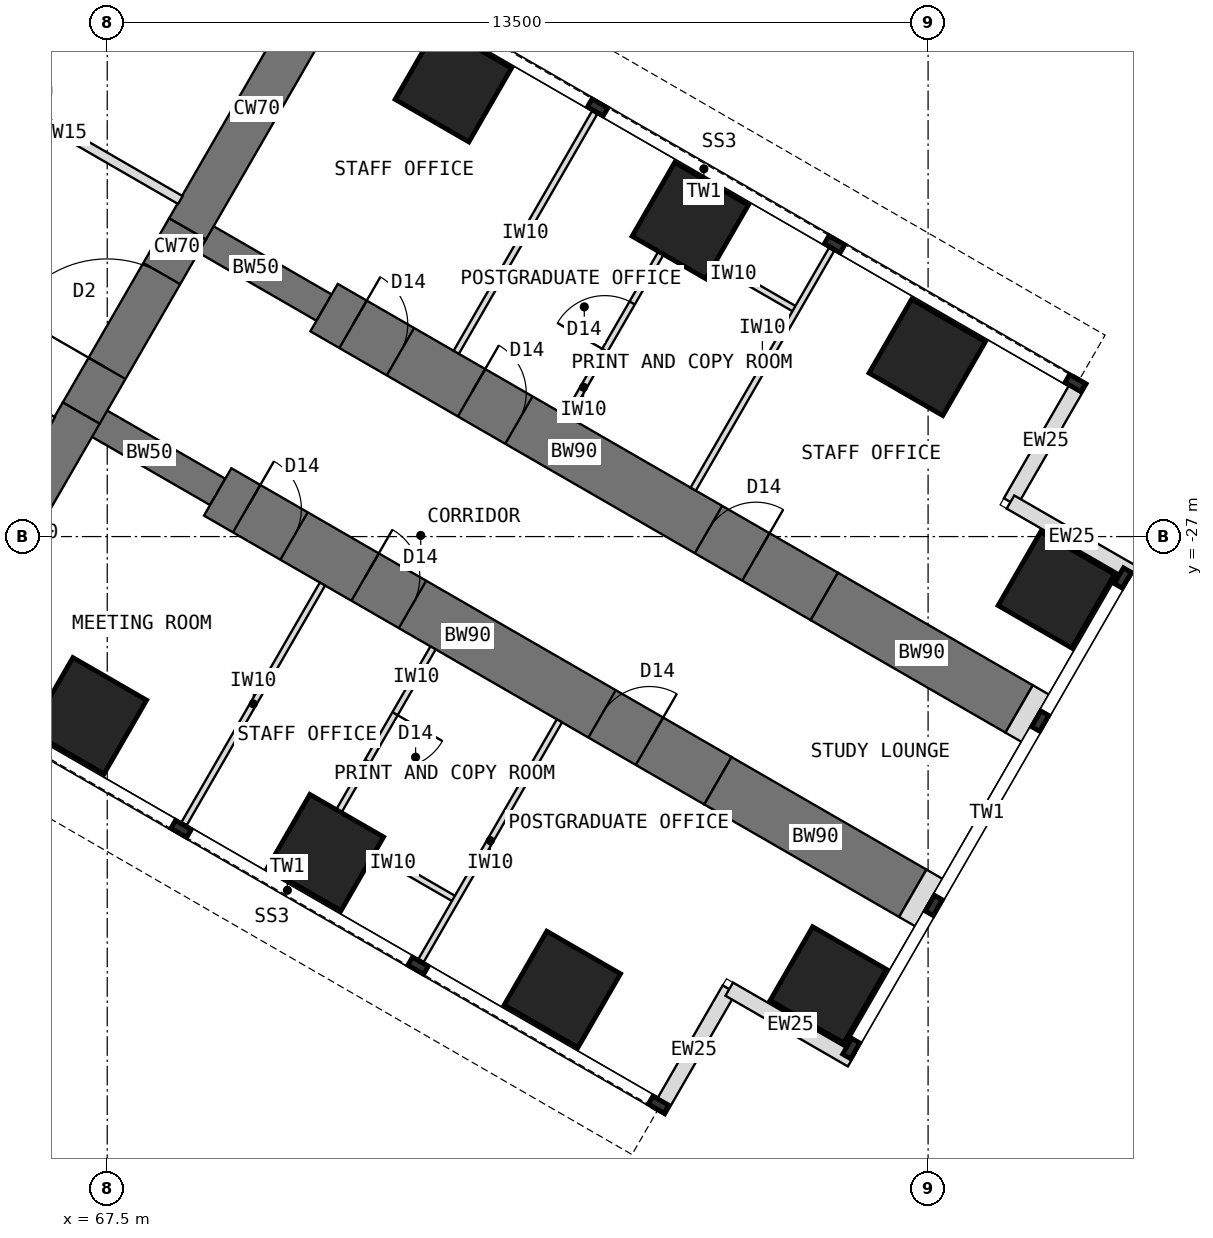
"""IFC4 building model, lengths in metres.
Left out: names, types, materials, properties, quantities, classifications, styles, units other than length and angle.
Written with IfcOpenShell. Run it as: python <this file> out.ifc"""

import sys

from ifc_helpers import new_model, si_unit, direction, frame, frame_2d, origin, origin_2d, place, context, subcontext, project, spatial, rectangle, extrude, element, fill, save


model = new_model("IFC4")
c1 = context("Model", 3, precision=1e-05, world=origin(), true_north=direction((0.0, 1.0)))
c2 = subcontext(c1, "Body", "Model", "MODEL_VIEW")
j1 = project(units=[si_unit("LENGTHUNIT", "METRE"), si_unit("PLANEANGLEUNIT", "RADIAN")], contexts=[c1])
p1 = place(None, origin())
s1 = spatial("IfcSite", under=j1, at=p1, CompositionType="ELEMENT")
p2 = place(p1, origin())
s2 = spatial("IfcBuilding", under=s1, at=p2, CompositionType="ELEMENT")
p3 = place(p2, frame((0.0, 0.0, 88.5)))
s3 = spatial("IfcBuildingStorey", under=s2, at=p3, CompositionType="ELEMENT", Elevation=88.5)
p4 = place(p3, frame((64.798, -28.908, 0.0), z_axis=(0.0, 0.0, 1.0), x_axis=(0.499984222037, 0.866034513004, 0.0)))
e1 = element("IfcWall", 1, at=p4, inside=s3, PredefinedType="SHEAR", context=c2, shape_type="SweptSolid", body=[
    extrude(rectangle(XDim=4.548, YDim=0.7, at=frame_2d((2.274, 0.0))), origin(), (0.0, 0.0, 1.0), 4.0),
])
p5 = place(p3, frame((67.072, -24.97, 0.0), z_axis=(0.0, 0.0, 1.0), x_axis=(0.500010275428, 0.866019471182, 0.0)))
e2 = element("IfcWall", 2, at=p5, inside=s3, PredefinedType="SHEAR", context=c2, shape_type="SweptSolid", body=[
    extrude(rectangle(XDim=3.5, YDim=0.7, at=frame_2d((1.75, 0.0))), origin(), (0.0, 0.0, 1.0), 4.0),
])
p6 = place(p5, frame((0.85, 0.0, 0.0)))
e3 = element("IfcOpeningElement", 3, at=p6, cuts=e2, PredefinedType="OPENING", context=c2, shape_type="SweptSolid", body=[
    extrude(rectangle(XDim=1.8, YDim=2.1, at=frame_2d((0.9, 1.05))), frame((0.0, 0.36, 0.0), z_axis=(0.0, -1.0, 0.0), x_axis=(1.0, 0.0, 0.0)), (0.0, 0.0, 1.0), 0.72),
])
p7 = place(p3, frame((68.822, -21.939, 0.0), z_axis=(0.0, 0.0, 1.0), x_axis=(0.500024481964, 0.866011268655, 0.0)))
e4 = element("IfcWall", 4, at=p7, inside=s3, PredefinedType="SHEAR", context=c2, shape_type="SweptSolid", body=[
    extrude(rectangle(XDim=4.548, YDim=0.7, at=frame_2d((2.274, 0.0))), origin(), (0.0, 0.0, 1.0), 4.0),
])
p8 = place(p3, frame((68.822, -21.939, 0.0), z_axis=(0.0, 0.0, 1.0), x_axis=(0.866072649678, -0.499918158782, 0.0)))
e5 = element("IfcWall", 5, at=p8, inside=s3, PredefinedType="SHEAR", context=c2, shape_type="SweptSolid", body=[
    extrude(rectangle(XDim=2.592, YDim=0.5, at=frame_2d((1.296, 0.0))), origin(), (0.0, 0.0, 1.0), 4.0),
])
p9 = place(p3, frame((71.066, -23.234, 0.0), z_axis=(0.0, 0.0, 1.0), x_axis=(0.86602681393, -0.499997557548, 0.0)))
e6 = element("IfcWall", 6, at=p9, inside=s3, PredefinedType="SHEAR", context=c2, shape_type="SweptSolid", body=[
    extrude(rectangle(XDim=9.5, YDim=0.9, at=frame_2d((4.75, 0.0))), origin(), (0.0, 0.0, 1.0), 4.0),
])
p10 = place(p9, frame((0.55, 0.0, 0.0)))
e7 = element("IfcOpeningElement", 7, at=p10, cuts=e6, PredefinedType="OPENING", context=c2, shape_type="SweptSolid", body=[
    extrude(rectangle(XDim=0.9, YDim=2.1, at=frame_2d((0.45, 1.05))), frame((0.0, 0.46, 0.0), z_axis=(0.0, -1.0, 0.0), x_axis=(1.0, 0.0, 0.0)), (0.0, 0.0, 1.0), 0.92),
])
p11 = place(p9, frame((2.8, 0.0, 0.0)))
e8 = element("IfcOpeningElement", 8, at=p11, cuts=e6, PredefinedType="OPENING", context=c2, shape_type="SweptSolid", body=[
    extrude(rectangle(XDim=0.9, YDim=2.1, at=frame_2d((0.45, 1.05))), frame((0.0, 0.46, 0.0), z_axis=(0.0, -1.0, 0.0), x_axis=(1.0, 0.0, 0.0)), (0.0, 0.0, 1.0), 0.92),
])
p12 = place(p9, frame((7.3, 0.0, 0.0)))
e9 = element("IfcOpeningElement", 9, at=p12, cuts=e6, PredefinedType="OPENING", context=c2, shape_type="SweptSolid", body=[
    extrude(rectangle(XDim=0.9, YDim=2.1, at=frame_2d((0.45, 1.05))), frame((0.0, 0.46, 0.0), z_axis=(0.0, -1.0, 0.0), x_axis=(1.0, 0.0, 0.0)), (0.0, 0.0, 1.0), 0.92),
])
p13 = place(p3, frame((79.294, -27.984, 0.0), z_axis=(0.0, 0.0, 1.0), x_axis=(0.866000971088, -0.500042316284, 0.0)))
e10 = element("IfcWall", 10, at=p13, inside=s3, PredefinedType="SHEAR", context=c2, shape_type="SweptSolid", body=[
    extrude(rectangle(XDim=3.7, YDim=0.9, at=frame_2d((1.85, 0.0))), origin(), (0.0, 0.0, 1.0), 4.0),
])
p14 = place(p3, frame((67.072, -24.97, 0.0), z_axis=(0.0, 0.0, 1.0), x_axis=(0.866031863473, -0.499988811324, 0.0)))
e11 = element("IfcWall", 11, at=p14, inside=s3, PredefinedType="SHEAR", context=c2, shape_type="SweptSolid", body=[
    extrude(rectangle(XDim=2.592, YDim=0.5, at=frame_2d((1.296, 0.0))), origin(), (0.0, 0.0, 1.0), 4.0),
])
p15 = place(p3, frame((69.316, -26.266, 0.0), z_axis=(0.0, 0.0, 1.0), x_axis=(0.86602681393, -0.499997557548, 0.0)))
e12 = element("IfcWall", 12, at=p15, inside=s3, PredefinedType="SHEAR", context=c2, shape_type="SweptSolid", body=[
    extrude(rectangle(XDim=9.5, YDim=0.9, at=frame_2d((4.75, 0.0))), origin(), (0.0, 0.0, 1.0), 4.0),
])
p16 = place(p15, frame((0.55, 0.0, 0.0)))
e13 = element("IfcOpeningElement", 13, at=p16, cuts=e12, PredefinedType="OPENING", context=c2, shape_type="SweptSolid", body=[
    extrude(rectangle(XDim=0.9, YDim=2.1, at=frame_2d((0.45, 1.05))), frame((0.0, 0.46, 0.0), z_axis=(0.0, -1.0, 0.0), x_axis=(1.0, 0.0, 0.0)), (0.0, 0.0, 1.0), 0.92),
])
p17 = place(p15, frame((2.8, 0.0, 0.0)))
e14 = element("IfcOpeningElement", 14, at=p17, cuts=e12, PredefinedType="OPENING", context=c2, shape_type="SweptSolid", body=[
    extrude(rectangle(XDim=0.9, YDim=2.1, at=frame_2d((0.45, 1.05))), frame((0.0, 0.46, 0.0), z_axis=(0.0, -1.0, 0.0), x_axis=(1.0, 0.0, 0.0)), (0.0, 0.0, 1.0), 0.92),
])
p18 = place(p15, frame((7.3, 0.0, 0.0)))
e15 = element("IfcOpeningElement", 15, at=p18, cuts=e12, PredefinedType="OPENING", context=c2, shape_type="SweptSolid", body=[
    extrude(rectangle(XDim=0.9, YDim=2.1, at=frame_2d((0.45, 1.05))), frame((0.0, 0.46, 0.0), z_axis=(0.0, -1.0, 0.0), x_axis=(1.0, 0.0, 0.0)), (0.0, 0.0, 1.0), 0.92),
])
p19 = place(p3, frame((77.544, -31.016, 0.0), z_axis=(0.0, 0.0, 1.0), x_axis=(0.866029545028, -0.499992827086, 0.0)))
e16 = element("IfcWall", 16, at=p19, inside=s3, PredefinedType="SHEAR", context=c2, shape_type="SweptSolid", body=[
    extrude(rectangle(XDim=3.7, YDim=0.9, at=frame_2d((1.85, 0.0))), origin(), (0.0, 0.0, 1.0), 4.0),
])
for number, where, z_axis, x_axis in (
    (17, (73.191, -19.554, 0.0), (0.0, 0.0, 1.0), (0.5, 0.866, 0.0)),
    (18, (67.191, -29.946, 0.0), (0.0, 0.0, 1.0), (0.5, 0.866, 0.0)),
    (19, (77.088, -21.804, 0.0), (0.0, 0.0, 1.0), (0.5, 0.866, 0.0)),
    (20, (71.088, -32.196, 0.0), (0.0, 0.0, 1.0), (0.5, 0.866, 0.0)),
    (21, (80.986, -24.054, 0.0), (0.0, 0.0, 1.0), (0.5, 0.866, 0.0)),
    (22, (74.986, -34.446, 0.0), (0.0, 0.0, 1.0), (0.5, 0.866, 0.0)),
    (23, (83.108, -27.877, 0.0), (0.0, 0.0, 1.0), (0.5, 0.866, 0.0)),
    (24, (79.358, -34.373, 0.0), (0.0, 0.0, 1.0), (0.5, 0.866, 0.0)),
):
    element("IfcColumn", number, at=place(p3, frame(where, z_axis=z_axis, x_axis=x_axis)), inside=s3, PredefinedType="COLUMN", context=c2, shape_type="SweptSolid", body=[
        extrude(rectangle(XDim=1.4, YDim=1.4, at=origin_2d()), origin(), (0.0, 0.0, 1.0), 4.0),
    ])
for number, where, z_axis, x_axis in (
    (25, (83.517, -24.419, 0.0), (0.0, 0.0, 1.0), (-0.5, -0.866, 0.0)),
    (26, (82.355, -26.432, 0.0), (0.0, 0.0, 1.0), (0.866, -0.5, 0.0)),
    (27, (76.567, -36.456, 0.0), (0.0, 0.0, 1.0), (0.5, 0.866, 0.0)),
    (28, (77.73, -34.443, 0.0), (0.0, 0.0, 1.0), (0.866, -0.5, 0.0)),
):
    element("IfcWall", number, at=place(p3, frame(where, z_axis=z_axis, x_axis=x_axis)), inside=s3, PredefinedType="STANDARD", context=c2, shape_type="SweptSolid", body=[
        extrude(rectangle(XDim=2.325, YDim=0.25, at=frame_2d((1.163, 0.0))), origin(), (0.0, 0.0, 1.0), 3.7),
    ])
for number, where, z_axis, x_axis in (
    (29, (82.498, -29.834, 0.0), (0.0, 0.0, 1.0), (0.866, -0.5, 0.0)),
    (30, (80.748, -32.865, 0.0), (0.0, 0.0, 1.0), (0.866, -0.5, 0.0)),
):
    element("IfcWall", number, at=place(p3, frame(where, z_axis=z_axis, x_axis=x_axis)), inside=s3, PredefinedType="PARTITIONING", context=c2, shape_type="SweptSolid", body=[
        extrude(rectangle(XDim=0.31, YDim=0.9, at=frame_2d((0.155, 0.0))), origin(), (0.0, 0.0, 1.0), 3.7),
    ])
p20 = place(p3, frame((64.62, -19.201, 0.0), z_axis=(0.0, 0.0, 1.0), x_axis=(0.866023886965, 0.500002627198, 0.0)))
e31 = element("IfcWall", 31, at=p20, inside=s3, PredefinedType="SHEAR", context=c2, shape_type="SweptSolid", body=[
    extrude(rectangle(XDim=5.858, YDim=0.4, at=frame_2d((2.929, 0.0))), origin(), (0.0, 0.0, 1.0), 4.0),
])
for number, where, z_axis, x_axis in (
    (32, (73.24, -23.97, 0.0), (0.0, 0.0, 1.0), (0.5, 0.866, 0.0)),
    (33, (77.137, -26.22, 0.0), (0.0, 0.0, 1.0), (0.5, 0.866, 0.0)),
):
    element("IfcWall", number, at=place(p3, frame(where, z_axis=z_axis, x_axis=x_axis)), inside=s3, PredefinedType="PARTITIONING", context=c2, shape_type="SweptSolid", body=[
        extrude(rectangle(XDim=4.55, YDim=0.1, at=frame_2d((2.275, 0.0))), origin(), (0.0, 0.0, 1.0), 3.7),
    ])
p21 = place(p3, frame((76.759, -22.075, 0.0), z_axis=(0.0, 0.0, 1.0), x_axis=(0.866024647952, -0.500001309137, 0.0)))
e34 = element("IfcWall", 34, at=p21, inside=s3, PredefinedType="PARTITIONING", context=c2, shape_type="SweptSolid", body=[
    extrude(rectangle(XDim=2.4, YDim=0.1, at=frame_2d((1.2, 0.0))), origin(), (0.0, 0.0, 1.0), 3.7),
])
p22 = place(p3, frame((75.059, -25.02, 0.0), z_axis=(0.0, 0.0, 1.0), x_axis=(0.499977295307, 0.866038511948, 0.0)))
e35 = element("IfcWall", 35, at=p22, inside=s3, PredefinedType="PARTITIONING", context=c2, shape_type="SweptSolid", body=[
    extrude(rectangle(XDim=3.4, YDim=0.1, at=frame_2d((1.7, 0.0))), origin(), (0.0, 0.0, 1.0), 3.7),
])
p23 = place(p22, frame((1.25, 0.0, 0.0)))
e36 = element("IfcOpeningElement", 36, at=p23, cuts=e35, PredefinedType="OPENING", context=c2, shape_type="SweptSolid", body=[
    extrude(rectangle(XDim=0.9, YDim=2.1, at=frame_2d((0.45, 1.05))), frame((0.0, 0.06, 0.0), z_axis=(0.0, -1.0, 0.0), x_axis=(1.0, 0.0, 0.0)), (0.0, 0.0, 1.0), 0.12),
])
for number, where, z_axis, x_axis in (
    (37, (71.04, -27.78, 0.0), (0.0, 0.0, 1.0), (-0.5, -0.866, 0.0)),
    (38, (74.937, -30.03, 0.0), (0.0, 0.0, 1.0), (-0.5, -0.866, 0.0)),
):
    element("IfcWall", number, at=place(p3, frame(where, z_axis=z_axis, x_axis=x_axis)), inside=s3, PredefinedType="PARTITIONING", context=c2, shape_type="SweptSolid", body=[
        extrude(rectangle(XDim=4.55, YDim=0.1, at=frame_2d((2.275, 0.0))), origin(), (0.0, 0.0, 1.0), 3.7),
    ])
p24 = place(p3, frame((71.158, -31.775, 0.0), z_axis=(0.0, 0.0, 1.0), x_axis=(0.866006032174, -0.500033551112, 0.0)))
e39 = element("IfcWall", 39, at=p24, inside=s3, PredefinedType="PARTITIONING", context=c2, shape_type="SweptSolid", body=[
    extrude(rectangle(XDim=2.4, YDim=0.1, at=frame_2d((1.2, 0.0))), origin(), (0.0, 0.0, 1.0), 3.7),
])
p25 = place(p3, frame((72.859, -28.83, 0.0), z_axis=(0.0, 0.0, 1.0), x_axis=(-0.500062241894, -0.865989465428, 0.0)))
e40 = element("IfcWall", 40, at=p25, inside=s3, PredefinedType="PARTITIONING", context=c2, shape_type="SweptSolid", body=[
    extrude(rectangle(XDim=3.4, YDim=0.1, at=frame_2d((1.7, 0.0))), origin(), (0.0, 0.0, 1.0), 3.7),
])
p26 = place(p25, frame((1.25, 0.0, 0.0)))
e41 = element("IfcOpeningElement", 41, at=p26, cuts=e40, PredefinedType="OPENING", context=c2, shape_type="SweptSolid", body=[
    extrude(rectangle(XDim=0.9, YDim=2.1, at=frame_2d((0.45, 1.05))), frame((0.0, 0.06, 0.0), z_axis=(0.0, -1.0, 0.0), x_axis=(1.0, 0.0, 0.0)), (0.0, 0.0, 1.0), 0.12),
])
p27 = place(p3, frame((64.87, -19.253, 0.0), z_axis=(0.0, 0.0, 1.0), x_axis=(0.866021148949, -0.500007369519, 0.0)))
e42 = element("IfcWall", 42, at=p27, inside=s3, PredefinedType="PARTITIONING", context=c2, shape_type="SweptSolid", body=[
    extrude(rectangle(XDim=4.426, YDim=0.15, at=frame_2d((2.213, 0.0))), origin(), (0.0, 0.0, 1.0), 3.7),
])
p28 = place(p27, frame((0.828, 0.0, 0.0)))
e43 = element("IfcOpeningElement", 43, at=p28, cuts=e42, PredefinedType="OPENING", context=c2, shape_type="SweptSolid", body=[
    extrude(rectangle(XDim=1.0, YDim=2.1, at=frame_2d((0.5, 1.05))), frame((0.0, 0.085, 0.0), z_axis=(0.0, -1.0, 0.0), x_axis=(1.0, 0.0, 0.0)), (0.0, 0.0, 1.0), 0.17),
])
p29 = place(p3, frame((66.603, -25.103, 0.0), z_axis=(0.0, 0.0, 1.0), x_axis=(-0.866021148949, 0.500007369519, 0.0)))
e44 = element("IfcWall", 44, at=p29, inside=s3, PredefinedType="PARTITIONING", context=c2, shape_type="SweptSolid", body=[
    extrude(rectangle(XDim=4.426, YDim=0.15, at=frame_2d((2.213, 0.0))), origin(), (0.0, 0.0, 1.0), 3.7),
])
p30 = place(p29, frame((2.598, 0.0, 0.0)))
e45 = element("IfcOpeningElement", 45, at=p30, cuts=e44, PredefinedType="OPENING", context=c2, shape_type="SweptSolid", body=[
    extrude(rectangle(XDim=1.0, YDim=2.1, at=frame_2d((0.5, 1.05))), frame((0.0, 0.085, 0.0), z_axis=(0.0, -1.0, 0.0), x_axis=(1.0, 0.0, 0.0)), (0.0, 0.0, 1.0), 0.17),
])
p31 = place(p6, origin())
e46 = element("IfcDoor", 46, at=p31, inside=s3, OperationType="DOUBLE_DOOR_DOUBLE_SWING", PredefinedType="DOOR", context=c2, shape_type="SweptSolid", body=[
    extrude(rectangle(XDim=1.72, YDim=2.06, at=frame_2d((0.9, 1.03))), frame((0.0, 0.025, 0.0), z_axis=(0.0, -1.0, 0.0), x_axis=(1.0, 0.0, 0.0)), (0.0, 0.0, 1.0), 0.05),
    extrude(rectangle(XDim=0.04, YDim=2.1, at=frame_2d((0.02, 1.05))), frame((0.0, 0.35, 0.0), z_axis=(0.0, -1.0, 0.0), x_axis=(1.0, 0.0, 0.0)), (0.0, 0.0, 1.0), 0.699),
    extrude(rectangle(XDim=0.04, YDim=2.1, at=frame_2d((1.78, 1.05))), frame((0.0, 0.35, 0.0), z_axis=(0.0, -1.0, 0.0), x_axis=(1.0, 0.0, 0.0)), (0.0, 0.0, 1.0), 0.699),
    extrude(rectangle(XDim=1.72, YDim=0.04, at=frame_2d((0.9, 2.08))), frame((0.0, 0.35, 0.0), z_axis=(0.0, -1.0, 0.0), x_axis=(1.0, 0.0, 0.0)), (0.0, 0.0, 1.0), 0.699),
])
fill(e3, e46)
p32 = place(p23, origin())
e47 = element("IfcDoor", 47, at=p32, inside=s3, OperationType="SINGLE_SWING_LEFT", PredefinedType="DOOR", context=c2, shape_type="SweptSolid", body=[
    extrude(rectangle(XDim=0.9, YDim=2.1, at=frame_2d((0.45, 1.05))), frame((0.0, 0.025, 0.0), z_axis=(0.0, -1.0, 0.0), x_axis=(1.0, 0.0, 0.0)), (0.0, 0.0, 1.0), 0.05),
])
fill(e36, e47)
p33 = place(p26, origin())
e48 = element("IfcDoor", 48, at=p33, inside=s3, OperationType="SINGLE_SWING_LEFT", PredefinedType="DOOR", context=c2, shape_type="SweptSolid", body=[
    extrude(rectangle(XDim=0.9, YDim=2.1, at=frame_2d((0.45, 1.05))), frame((0.0, 0.025, 0.0), z_axis=(0.0, -1.0, 0.0), x_axis=(1.0, 0.0, 0.0)), (0.0, 0.0, 1.0), 0.05),
])
fill(e41, e48)
p34 = place(p10, origin())
e49 = element("IfcDoor", 49, at=p34, inside=s3, OperationType="SINGLE_SWING_LEFT", PredefinedType="DOOR", context=c2, shape_type="SweptSolid", body=[
    extrude(rectangle(XDim=0.82, YDim=2.06, at=frame_2d((0.45, 1.03))), frame((0.0, 0.025, 0.0), z_axis=(0.0, -1.0, 0.0), x_axis=(1.0, 0.0, 0.0)), (0.0, 0.0, 1.0), 0.05),
    extrude(rectangle(XDim=0.04, YDim=2.1, at=frame_2d((0.02, 1.05))), frame((0.0, 0.45, 0.0), z_axis=(0.0, -1.0, 0.0), x_axis=(1.0, 0.0, 0.0)), (0.0, 0.0, 1.0), 0.899),
    extrude(rectangle(XDim=0.04, YDim=2.1, at=frame_2d((0.88, 1.05))), frame((0.0, 0.45, 0.0), z_axis=(0.0, -1.0, 0.0), x_axis=(1.0, 0.0, 0.0)), (0.0, 0.0, 1.0), 0.899),
    extrude(rectangle(XDim=0.82, YDim=0.04, at=frame_2d((0.45, 2.08))), frame((0.0, 0.45, 0.0), z_axis=(0.0, -1.0, 0.0), x_axis=(1.0, 0.0, 0.0)), (0.0, 0.0, 1.0), 0.899),
])
fill(e7, e49)
p35 = place(p11, origin())
e50 = element("IfcDoor", 50, at=p35, inside=s3, OperationType="SINGLE_SWING_LEFT", PredefinedType="DOOR", context=c2, shape_type="SweptSolid", body=[
    extrude(rectangle(XDim=0.82, YDim=2.06, at=frame_2d((0.45, 1.03))), frame((0.0, 0.025, 0.0), z_axis=(0.0, -1.0, 0.0), x_axis=(1.0, 0.0, 0.0)), (0.0, 0.0, 1.0), 0.05),
    extrude(rectangle(XDim=0.04, YDim=2.1, at=frame_2d((0.02, 1.05))), frame((0.0, 0.45, 0.0), z_axis=(0.0, -1.0, 0.0), x_axis=(1.0, 0.0, 0.0)), (0.0, 0.0, 1.0), 0.899),
    extrude(rectangle(XDim=0.04, YDim=2.1, at=frame_2d((0.88, 1.05))), frame((0.0, 0.45, 0.0), z_axis=(0.0, -1.0, 0.0), x_axis=(1.0, 0.0, 0.0)), (0.0, 0.0, 1.0), 0.899),
    extrude(rectangle(XDim=0.82, YDim=0.04, at=frame_2d((0.45, 2.08))), frame((0.0, 0.45, 0.0), z_axis=(0.0, -1.0, 0.0), x_axis=(1.0, 0.0, 0.0)), (0.0, 0.0, 1.0), 0.899),
])
fill(e8, e50)
p36 = place(p12, origin())
e51 = element("IfcDoor", 51, at=p36, inside=s3, OperationType="SINGLE_SWING_RIGHT", PredefinedType="DOOR", context=c2, shape_type="SweptSolid", body=[
    extrude(rectangle(XDim=0.82, YDim=2.06, at=frame_2d((0.45, 1.03))), frame((0.0, 0.025, 0.0), z_axis=(0.0, -1.0, 0.0), x_axis=(1.0, 0.0, 0.0)), (0.0, 0.0, 1.0), 0.05),
    extrude(rectangle(XDim=0.04, YDim=2.1, at=frame_2d((0.02, 1.05))), frame((0.0, 0.45, 0.0), z_axis=(0.0, -1.0, 0.0), x_axis=(1.0, 0.0, 0.0)), (0.0, 0.0, 1.0), 0.899),
    extrude(rectangle(XDim=0.04, YDim=2.1, at=frame_2d((0.88, 1.05))), frame((0.0, 0.45, 0.0), z_axis=(0.0, -1.0, 0.0), x_axis=(1.0, 0.0, 0.0)), (0.0, 0.0, 1.0), 0.899),
    extrude(rectangle(XDim=0.82, YDim=0.04, at=frame_2d((0.45, 2.08))), frame((0.0, 0.45, 0.0), z_axis=(0.0, -1.0, 0.0), x_axis=(1.0, 0.0, 0.0)), (0.0, 0.0, 1.0), 0.899),
])
fill(e9, e51)
p37 = place(p16, origin())
e52 = element("IfcDoor", 52, at=p37, inside=s3, OperationType="SINGLE_SWING_LEFT", PredefinedType="DOOR", context=c2, shape_type="SweptSolid", body=[
    extrude(rectangle(XDim=0.82, YDim=2.06, at=frame_2d((0.45, 1.03))), frame((0.0, 0.025, 0.0), z_axis=(0.0, -1.0, 0.0), x_axis=(1.0, 0.0, 0.0)), (0.0, 0.0, 1.0), 0.05),
    extrude(rectangle(XDim=0.04, YDim=2.1, at=frame_2d((0.02, 1.05))), frame((0.0, 0.45, 0.0), z_axis=(0.0, -1.0, 0.0), x_axis=(1.0, 0.0, 0.0)), (0.0, 0.0, 1.0), 0.899),
    extrude(rectangle(XDim=0.04, YDim=2.1, at=frame_2d((0.88, 1.05))), frame((0.0, 0.45, 0.0), z_axis=(0.0, -1.0, 0.0), x_axis=(1.0, 0.0, 0.0)), (0.0, 0.0, 1.0), 0.899),
    extrude(rectangle(XDim=0.82, YDim=0.04, at=frame_2d((0.45, 2.08))), frame((0.0, 0.45, 0.0), z_axis=(0.0, -1.0, 0.0), x_axis=(1.0, 0.0, 0.0)), (0.0, 0.0, 1.0), 0.899),
])
fill(e13, e52)
p38 = place(p17, origin())
e53 = element("IfcDoor", 53, at=p38, inside=s3, OperationType="SINGLE_SWING_LEFT", PredefinedType="DOOR", context=c2, shape_type="SweptSolid", body=[
    extrude(rectangle(XDim=0.82, YDim=2.06, at=frame_2d((0.45, 1.03))), frame((0.0, 0.025, 0.0), z_axis=(0.0, -1.0, 0.0), x_axis=(1.0, 0.0, 0.0)), (0.0, 0.0, 1.0), 0.05),
    extrude(rectangle(XDim=0.04, YDim=2.1, at=frame_2d((0.02, 1.05))), frame((0.0, 0.45, 0.0), z_axis=(0.0, -1.0, 0.0), x_axis=(1.0, 0.0, 0.0)), (0.0, 0.0, 1.0), 0.899),
    extrude(rectangle(XDim=0.04, YDim=2.1, at=frame_2d((0.88, 1.05))), frame((0.0, 0.45, 0.0), z_axis=(0.0, -1.0, 0.0), x_axis=(1.0, 0.0, 0.0)), (0.0, 0.0, 1.0), 0.899),
    extrude(rectangle(XDim=0.82, YDim=0.04, at=frame_2d((0.45, 2.08))), frame((0.0, 0.45, 0.0), z_axis=(0.0, -1.0, 0.0), x_axis=(1.0, 0.0, 0.0)), (0.0, 0.0, 1.0), 0.899),
])
fill(e14, e53)
p39 = place(p18, origin())
e54 = element("IfcDoor", 54, at=p39, inside=s3, OperationType="SINGLE_SWING_RIGHT", PredefinedType="DOOR", context=c2, shape_type="SweptSolid", body=[
    extrude(rectangle(XDim=0.82, YDim=2.06, at=frame_2d((0.45, 1.03))), frame((0.0, 0.025, 0.0), z_axis=(0.0, -1.0, 0.0), x_axis=(1.0, 0.0, 0.0)), (0.0, 0.0, 1.0), 0.05),
    extrude(rectangle(XDim=0.04, YDim=2.1, at=frame_2d((0.02, 1.05))), frame((0.0, 0.45, 0.0), z_axis=(0.0, -1.0, 0.0), x_axis=(1.0, 0.0, 0.0)), (0.0, 0.0, 1.0), 0.899),
    extrude(rectangle(XDim=0.04, YDim=2.1, at=frame_2d((0.88, 1.05))), frame((0.0, 0.45, 0.0), z_axis=(0.0, -1.0, 0.0), x_axis=(1.0, 0.0, 0.0)), (0.0, 0.0, 1.0), 0.899),
    extrude(rectangle(XDim=0.82, YDim=0.04, at=frame_2d((0.45, 2.08))), frame((0.0, 0.45, 0.0), z_axis=(0.0, -1.0, 0.0), x_axis=(1.0, 0.0, 0.0)), (0.0, 0.0, 1.0), 0.899),
])
fill(e15, e54)
save(model, sys.argv[1])
